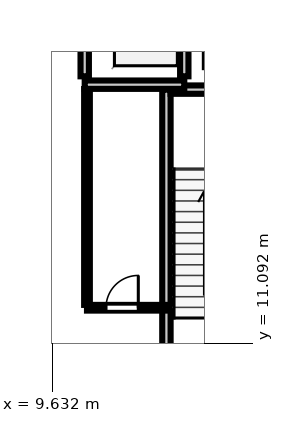
"""IFC4 building model, lengths in metres.
Left out: names, types, materials, properties, quantities, classifications, styles, units other than length and angle.
Written with IfcOpenShell. Run it as: python <this file> out.ifc"""

import sys

from ifc_helpers import new_model, si_unit, direction, frame, frame_2d, origin, place, context, subcontext, project, spatial, rectangle, extrude, element, fill, save


model = new_model("IFC4")
c1 = context("Model", 3, precision=1e-05, world=origin(), true_north=direction((0.0, 1.0)))
c2 = subcontext(c1, "Body", "Model", "MODEL_VIEW")
j1 = project(units=[si_unit("LENGTHUNIT", "METRE"), si_unit("PLANEANGLEUNIT", "RADIAN")], contexts=[c1])
p1 = place(None, origin())
s1 = spatial("IfcSite", under=j1, at=p1, CompositionType="ELEMENT")
p2 = place(p1, origin())
s2 = spatial("IfcBuilding", under=s1, at=p2, CompositionType="ELEMENT")
p3 = place(p2, origin())
s3 = spatial("IfcBuildingStorey", under=s2, at=p3, CompositionType="ELEMENT", Elevation=0.0)
p4 = place(p3, frame((12.64, 10.05, 0.0), z_axis=(0.0, 0.0, 1.0), x_axis=(0.0, 1.0, 0.0)))
e1 = element("IfcWall", 1, at=p4, inside=s3, PredefinedType="SOLIDWALL", context=c2, shape_type="SweptSolid", body=[
    extrude(rectangle(XDim=7.71, YDim=0.22, at=frame_2d((3.855, 0.0))), origin(), (0.0, 0.0, 1.0), 4.86),
])
p5 = place(p3, frame((12.75, 17.76, 0.0), z_axis=(0.0, 0.0, 1.0), x_axis=(1.0, 0.0, 0.0)))
e2 = element("IfcWall", 2, at=p5, inside=s3, PredefinedType="SOLIDWALL", context=c2, shape_type="SweptSolid", body=[
    extrude(rectangle(XDim=3.6, YDim=0.22, at=frame_2d((1.8, 0.0))), origin(), (0.0, 0.0, 1.0), 4.86),
])
p6 = place(p3, frame((10.49, 18.11, 0.0), z_axis=(0.0, 0.0, 1.0), x_axis=(0.0, 1.0, 0.0)))
e3 = element("IfcWall", 3, at=p6, inside=s3, PredefinedType="SOLIDWALL", context=c2, shape_type="SweptSolid", body=[
    extrude(rectangle(XDim=2.58, YDim=0.22, at=frame_2d((1.29, 0.0))), origin(), (0.0, 0.0, 1.0), 4.86),
])
p7 = place(p6, frame((0.74, 0.0, 0.0)))
e4 = element("IfcOpeningElement", 4, at=p7, cuts=e3, PredefinedType="OPENING", context=c2, shape_type="SweptSolid", body=[
    extrude(rectangle(XDim=1.1, YDim=2.2, at=frame_2d((0.55, 1.1))), frame((0.0, 0.122, 0.0), z_axis=(0.0, -1.0, 0.0), x_axis=(1.0, 0.0, 0.0)), (0.0, 0.0, 1.0), 0.244),
])
p8 = place(p3, frame((13.11, 18.11, 0.0), z_axis=(0.0, 0.0, 1.0), x_axis=(0.0, 1.0, 0.0)))
e5 = element("IfcWall", 5, at=p8, inside=s3, PredefinedType="SOLIDWALL", context=c2, shape_type="SweptSolid", body=[
    extrude(rectangle(XDim=2.58, YDim=0.22, at=frame_2d((1.29, 0.0))), origin(), (0.0, 0.0, 1.0), 4.86),
])
p9 = place(p3, frame((10.49, 17.89, 0.0), z_axis=(0.0, 0.0, 1.0), x_axis=(1.0, 0.0, 0.0)))
e6 = element("IfcWall", 6, at=p9, inside=s3, PredefinedType="SOLIDWALL", context=c2, shape_type="SweptSolid", body=[
    extrude(rectangle(XDim=2.62, YDim=0.22, at=frame_2d((1.31, 0.0))), origin(), (0.0, 0.0, 1.0), 4.86),
])
p10 = place(p3, frame((10.55, 12.02, 0.0), z_axis=(0.0, 0.0, 1.0), x_axis=(1.0, 0.0, 0.0)))
e7 = element("IfcWall", 7, at=p10, inside=s3, PredefinedType="PARTITIONING", context=c2, shape_type="SweptSolid", body=[
    extrude(rectangle(XDim=2.08, YDim=0.15, at=frame_2d((1.04, 0.0))), origin(), (0.0, 0.0, 1.0), 4.86),
])
p11 = place(p10, frame((0.5, 0.0, 0.0)))
e8 = element("IfcOpeningElement", 8, at=p11, cuts=e7, PredefinedType="OPENING", context=c2, shape_type="SweptSolid", body=[
    extrude(rectangle(XDim=0.85, YDim=2.1, at=frame_2d((0.425, 1.05))), frame((0.0, 0.087, 0.0), z_axis=(0.0, -1.0, 0.0), x_axis=(1.0, 0.0, 0.0)), (0.0, 0.0, 1.0), 0.174),
])
p12 = place(p3, frame((10.55, 12.095, 0.0), z_axis=(0.0, 0.0, 1.0), x_axis=(0.0, 1.0, 0.0)))
e9 = element("IfcWall", 9, at=p12, inside=s3, PredefinedType="PARTITIONING", context=c2, shape_type="SweptSolid", body=[
    extrude(rectangle(XDim=5.68, YDim=0.15, at=frame_2d((2.84, 0.0))), origin(), (0.0, 0.0, 1.0), 4.86),
])
p13 = place(p11, origin())
e10 = element("IfcDoor", 10, at=p13, inside=s3, OperationType="SINGLE_SWING_RIGHT", PredefinedType="DOOR", context=c2, shape_type="SweptSolid", body=[
    extrude(rectangle(XDim=0.85, YDim=2.1, at=frame_2d((0.425, 1.05))), frame((0.0, 0.025, 0.0), z_axis=(0.0, -1.0, 0.0), x_axis=(1.0, 0.0, 0.0)), (0.0, 0.0, 1.0), 0.05),
])
fill(e8, e10)
save(model, sys.argv[1])
